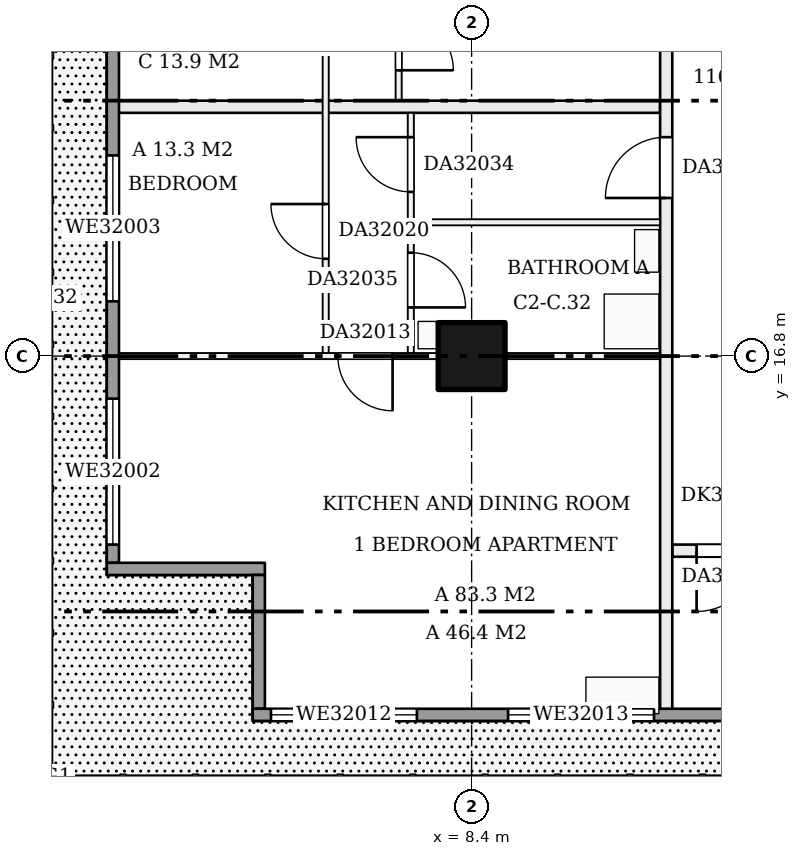
"""IFC4 building model, lengths in metres.
Left out: names, types, materials, properties, quantities, classifications, styles, units other than length and angle.
Written with IfcOpenShell. Run it as: python <this file> out.ifc"""

import sys

from ifc_helpers import new_model, si_unit, direction, frame, frame_2d, origin, origin_2d, place, context, subcontext, project, spatial, rectangle, extrude, element, fill, save


model = new_model("IFC4")
c1 = context("Model", 3, precision=1e-05, world=origin(), true_north=direction((0.0, 1.0)))
c2 = subcontext(c1, "Body", "Model", "MODEL_VIEW")
j1 = project(units=[si_unit("LENGTHUNIT", "METRE"), si_unit("PLANEANGLEUNIT", "RADIAN")], contexts=[c1])
p1 = place(None, origin())
s1 = spatial("IfcSite", under=j1, at=p1, CompositionType="ELEMENT")
p2 = place(p1, origin())
s2 = spatial("IfcBuilding", under=s1, at=p2, CompositionType="ELEMENT")
p3 = place(p2, frame((0.0, 0.0, 126.7)))
s3 = spatial("IfcBuildingStorey", under=s2, at=p3, CompositionType="ELEMENT", Elevation=126.7)
p4 = place(p3, frame((8.4, 16.8, 0.0), z_axis=(0.0, 0.0, 1.0), x_axis=(1.0, 0.0, 0.0)))
e1 = element("IfcColumn", 1, at=p4, inside=s3, PredefinedType="COLUMN", context=c2, shape_type="SweptSolid", body=[
    extrude(rectangle(XDim=1.1, YDim=1.1, at=origin_2d()), origin(), (0.0, 0.0, 1.0), 3.22),
])
p5 = place(p3, frame((11.7, 13.6, 0.0), z_axis=(0.0, 0.0, 1.0), x_axis=(1.0, 0.0, 0.0)))
e2 = element("IfcWall", 2, at=p5, inside=s3, PredefinedType="PARTITIONING", context=c2, shape_type="SweptSolid", body=[
    extrude(rectangle(XDim=1.8, YDim=0.2, at=frame_2d((0.9, 0.0))), origin(), (0.0, 0.0, 1.0), 3.22),
])
p6 = place(p5, frame((0.4, 0.0, 0.0)))
e3 = element("IfcOpeningElement", 3, at=p6, cuts=e2, PredefinedType="OPENING", context=c2, shape_type="SweptSolid", body=[
    extrude(rectangle(XDim=1.0, YDim=2.1, at=frame_2d((0.5, 1.05))), frame((0.0, 0.11, 0.0), z_axis=(0.0, -1.0, 0.0), x_axis=(1.0, 0.0, 0.0)), (0.0, 0.0, 1.0), 0.22),
])
p7 = place(p3, frame((2.5, 16.8, 0.0), z_axis=(0.0, 0.0, 1.0), x_axis=(1.0, 0.0, 0.0)))
e4 = element("IfcWall", 4, at=p7, inside=s3, PredefinedType="PARTITIONING", context=c2, shape_type="SweptSolid", body=[
    extrude(rectangle(XDim=9.0, YDim=0.1, at=frame_2d((4.5, 0.0))), origin(), (0.0, 0.0, 1.0), 3.22),
])
p8 = place(p7, frame((3.7, 0.0, 0.0)))
e5 = element("IfcOpeningElement", 5, at=p8, cuts=e4, PredefinedType="OPENING", context=c2, shape_type="SweptSolid", body=[
    extrude(rectangle(XDim=0.9, YDim=2.1, at=frame_2d((0.45, 1.05))), frame((0.0, 0.06, 0.0), z_axis=(0.0, -1.0, 0.0), x_axis=(1.0, 0.0, 0.0)), (0.0, 0.0, 1.0), 0.12),
])
p9 = place(p3, frame((7.45, 19.0, 0.0), z_axis=(0.0, 0.0, 1.0), x_axis=(1.0, 0.0, 0.0)))
e6 = element("IfcWall", 6, at=p9, inside=s3, PredefinedType="PARTITIONING", context=c2, shape_type="SweptSolid", body=[
    extrude(rectangle(XDim=4.05, YDim=0.1, at=frame_2d((2.025, 0.0))), origin(), (0.0, 0.0, 1.0), 3.22),
])
p10 = place(p3, frame((2.5, 20.9, 0.0), z_axis=(0.0, 0.0, 1.0), x_axis=(1.0, 0.0, 0.0)))
e7 = element("IfcWall", 7, at=p10, inside=s3, PredefinedType="PARTITIONING", context=c2, shape_type="SweptSolid", body=[
    extrude(rectangle(XDim=9.0, YDim=0.2, at=frame_2d((4.5, 0.0))), origin(), (0.0, 0.0, 1.0), 3.22),
])
p11 = place(p3, frame((6.0, 16.85, 0.0), z_axis=(0.0, 0.0, 1.0), x_axis=(0.0, 1.0, 0.0)))
e8 = element("IfcWall", 8, at=p11, inside=s3, PredefinedType="PARTITIONING", context=c2, shape_type="SweptSolid", body=[
    extrude(rectangle(XDim=25.05, YDim=0.1, at=frame_2d((12.525, 0.0))), origin(), (0.0, 0.0, 1.0), 3.22),
])
p12 = place(p11, frame((1.55, 0.0, 0.0)))
e9 = element("IfcOpeningElement", 9, at=p12, cuts=e8, PredefinedType="OPENING", context=c2, shape_type="SweptSolid", body=[
    extrude(rectangle(XDim=0.9, YDim=2.1, at=frame_2d((0.45, 1.05))), frame((0.0, 0.06, 0.0), z_axis=(0.0, -1.0, 0.0), x_axis=(1.0, 0.0, 0.0)), (0.0, 0.0, 1.0), 0.12),
])
p13 = place(p11, frame((5.75, 0.0, 0.0)))
e10 = element("IfcOpeningElement", 10, at=p13, cuts=e8, PredefinedType="OPENING", context=c2, shape_type="SweptSolid", body=[
    extrude(rectangle(XDim=0.9, YDim=2.1, at=frame_2d((0.45, 1.05))), frame((0.0, 0.06, 0.0), z_axis=(0.0, -1.0, 0.0), x_axis=(1.0, 0.0, 0.0)), (0.0, 0.0, 1.0), 0.12),
])
p14 = place(p11, frame((14.15, 0.0, 0.0)))
e11 = element("IfcOpeningElement", 11, at=p14, cuts=e8, PredefinedType="OPENING", context=c2, shape_type="SweptSolid", body=[
    extrude(rectangle(XDim=0.9, YDim=2.1, at=frame_2d((0.45, 1.05))), frame((0.0, 0.06, 0.0), z_axis=(0.0, -1.0, 0.0), x_axis=(1.0, 0.0, 0.0)), (0.0, 0.0, 1.0), 0.12),
])
p15 = place(p11, frame((22.55, 0.0, 0.0)))
e12 = element("IfcOpeningElement", 12, at=p15, cuts=e8, PredefinedType="OPENING", context=c2, shape_type="SweptSolid", body=[
    extrude(rectangle(XDim=0.9, YDim=2.1, at=frame_2d((0.45, 1.05))), frame((0.0, 0.06, 0.0), z_axis=(0.0, -1.0, 0.0), x_axis=(1.0, 0.0, 0.0)), (0.0, 0.0, 1.0), 0.12),
])
p16 = place(p3, frame((7.2, 21.0, 0.0), z_axis=(0.0, 0.0, 1.0), x_axis=(0.0, 1.0, 0.0)))
e13 = element("IfcWall", 13, at=p16, inside=s3, PredefinedType="PARTITIONING", context=c2, shape_type="SweptSolid", body=[
    extrude(rectangle(XDim=20.9, YDim=0.1, at=frame_2d((10.45, 0.0))), origin(), (0.0, 0.0, 1.0), 3.22),
])
p17 = place(p16, frame((2.837, 0.0, 0.0)))
e14 = element("IfcOpeningElement", 14, at=p17, cuts=e13, PredefinedType="OPENING", context=c2, shape_type="SweptSolid", body=[
    extrude(rectangle(XDim=0.9, YDim=2.1, at=frame_2d((0.45, 1.05))), frame((0.0, 0.06, 0.0), z_axis=(0.0, -1.0, 0.0), x_axis=(1.0, 0.0, 0.0)), (0.0, 0.0, 1.0), 0.12),
])
p18 = place(p16, frame((0.5, 0.0, 0.0)))
e15 = element("IfcOpeningElement", 15, at=p18, cuts=e13, PredefinedType="OPENING", context=c2, shape_type="SweptSolid", body=[
    extrude(rectangle(XDim=0.9, YDim=2.1, at=frame_2d((0.45, 1.05))), frame((0.0, 0.06, 0.0), z_axis=(0.0, -1.0, 0.0), x_axis=(1.0, 0.0, 0.0)), (0.0, 0.0, 1.0), 0.12),
])
p19 = place(p16, frame((5.175, 0.0, 0.0)))
e16 = element("IfcOpeningElement", 16, at=p19, cuts=e13, PredefinedType="OPENING", context=c2, shape_type="SweptSolid", body=[
    extrude(rectangle(XDim=0.9, YDim=2.1, at=frame_2d((0.45, 1.05))), frame((0.0, 0.06, 0.0), z_axis=(0.0, -1.0, 0.0), x_axis=(1.0, 0.0, 0.0)), (0.0, 0.0, 1.0), 0.12),
])
p20 = place(p16, frame((7.613, 0.0, 0.0)))
e17 = element("IfcOpeningElement", 17, at=p20, cuts=e13, PredefinedType="OPENING", context=c2, shape_type="SweptSolid", body=[
    extrude(rectangle(XDim=0.9, YDim=2.1, at=frame_2d((0.45, 1.05))), frame((0.0, 0.06, 0.0), z_axis=(0.0, -1.0, 0.0), x_axis=(1.0, 0.0, 0.0)), (0.0, 0.0, 1.0), 0.12),
])
p21 = place(p16, frame((10.35, 0.0, 0.0)))
e18 = element("IfcOpeningElement", 18, at=p21, cuts=e13, PredefinedType="OPENING", context=c2, shape_type="SweptSolid", body=[
    extrude(rectangle(XDim=0.9, YDim=2.1, at=frame_2d((0.45, 1.05))), frame((0.0, 0.06, 0.0), z_axis=(0.0, -1.0, 0.0), x_axis=(1.0, 0.0, 0.0)), (0.0, 0.0, 1.0), 0.12),
])
p22 = place(p16, frame((13.088, 0.0, 0.0)))
e19 = element("IfcOpeningElement", 19, at=p22, cuts=e13, PredefinedType="OPENING", context=c2, shape_type="SweptSolid", body=[
    extrude(rectangle(XDim=0.9, YDim=2.1, at=frame_2d((0.45, 1.05))), frame((0.0, 0.06, 0.0), z_axis=(0.0, -1.0, 0.0), x_axis=(1.0, 0.0, 0.0)), (0.0, 0.0, 1.0), 0.12),
])
p23 = place(p16, frame((16.125, 0.0, 0.0)))
e20 = element("IfcOpeningElement", 20, at=p23, cuts=e13, PredefinedType="OPENING", context=c2, shape_type="SweptSolid", body=[
    extrude(rectangle(XDim=0.9, YDim=2.1, at=frame_2d((0.45, 1.05))), frame((0.0, 0.06, 0.0), z_axis=(0.0, -1.0, 0.0), x_axis=(1.0, 0.0, 0.0)), (0.0, 0.0, 1.0), 0.12),
])
p24 = place(p16, frame((19.163, 0.0, 0.0)))
e21 = element("IfcOpeningElement", 21, at=p24, cuts=e13, PredefinedType="OPENING", context=c2, shape_type="SweptSolid", body=[
    extrude(rectangle(XDim=0.9, YDim=2.1, at=frame_2d((0.45, 1.05))), frame((0.0, 0.06, 0.0), z_axis=(0.0, -1.0, 0.0), x_axis=(1.0, 0.0, 0.0)), (0.0, 0.0, 1.0), 0.12),
])
p25 = place(p3, frame((7.4, 16.85, 0.0), z_axis=(0.0, 0.0, 1.0), x_axis=(0.0, 1.0, 0.0)))
e22 = element("IfcWall", 22, at=p25, inside=s3, PredefinedType="PARTITIONING", context=c2, shape_type="SweptSolid", body=[
    extrude(rectangle(XDim=3.95, YDim=0.1, at=frame_2d((1.975, 0.0))), origin(), (0.0, 0.0, 1.0), 3.22),
])
p26 = place(p25, frame((2.65, 0.0, 0.0)))
e23 = element("IfcOpeningElement", 23, at=p26, cuts=e22, PredefinedType="OPENING", context=c2, shape_type="SweptSolid", body=[
    extrude(rectangle(XDim=0.9, YDim=2.1, at=frame_2d((0.45, 1.05))), frame((0.0, 0.06, 0.0), z_axis=(0.0, -1.0, 0.0), x_axis=(1.0, 0.0, 0.0)), (0.0, 0.0, 1.0), 0.12),
])
p27 = place(p25, frame((0.75, 0.0, 0.0)))
e24 = element("IfcOpeningElement", 24, at=p27, cuts=e22, PredefinedType="OPENING", context=c2, shape_type="SweptSolid", body=[
    extrude(rectangle(XDim=0.9, YDim=2.1, at=frame_2d((0.45, 1.05))), frame((0.0, 0.06, 0.0), z_axis=(0.0, -1.0, 0.0), x_axis=(1.0, 0.0, 0.0)), (0.0, 0.0, 1.0), 0.12),
])
p28 = place(p3, frame((11.6, 10.9, 0.0), z_axis=(0.0, 0.0, 1.0), x_axis=(0.0, 1.0, 0.0)))
e25 = element("IfcWall", 25, at=p28, inside=s3, PredefinedType="PARTITIONING", context=c2, shape_type="SweptSolid", body=[
    extrude(rectangle(XDim=31.1, YDim=0.2, at=frame_2d((15.55, 0.0))), origin(), (0.0, 0.0, 1.0), 3.22),
])
p29 = place(p28, frame((8.5, 0.0, 0.0)))
e26 = element("IfcOpeningElement", 26, at=p29, cuts=e25, PredefinedType="OPENING", context=c2, shape_type="SweptSolid", body=[
    extrude(rectangle(XDim=1.0, YDim=2.1, at=frame_2d((0.5, 1.05))), frame((0.0, 0.11, 0.0), z_axis=(0.0, -1.0, 0.0), x_axis=(1.0, 0.0, 0.0)), (0.0, 0.0, 1.0), 0.22),
])
p30 = place(p28, frame((12.937, 0.0, 0.0)))
e27 = element("IfcOpeningElement", 27, at=p30, cuts=e25, PredefinedType="OPENING", context=c2, shape_type="SweptSolid", body=[
    extrude(rectangle(XDim=1.0, YDim=2.1, at=frame_2d((0.5, 1.05))), frame((0.0, 0.11, 0.0), z_axis=(0.0, -1.0, 0.0), x_axis=(1.0, 0.0, 0.0)), (0.0, 0.0, 1.0), 0.22),
])
p31 = place(p3, frame((2.5, 53.8, 0.0), z_axis=(0.0, 0.0, 1.0), x_axis=(0.0, -1.0, 0.0)))
e28 = element("IfcWall", 28, at=p31, inside=s3, PredefinedType="SOLIDWALL", context=c2, shape_type="SweptSolid", body=[
    extrude(rectangle(XDim=40.4, YDim=0.2, at=frame_2d((20.2, 0.0))), origin(), (0.0, 0.0, 1.0), 3.22),
])
p32 = place(p31, frame((37.7, 0.0, 0.9)))
e29 = element("IfcOpeningElement", 29, at=p32, cuts=e28, PredefinedType="OPENING", context=c2, shape_type="SweptSolid", body=[
    extrude(rectangle(XDim=2.4, YDim=1.5, at=frame_2d((1.2, 0.75))), frame((0.0, 0.11, 0.0), z_axis=(0.0, -1.0, 0.0), x_axis=(1.0, 0.0, 0.0)), (0.0, 0.0, 1.0), 0.22),
])
p33 = place(p31, frame((33.7, 0.0, 0.9)))
e30 = element("IfcOpeningElement", 30, at=p33, cuts=e28, PredefinedType="OPENING", context=c2, shape_type="SweptSolid", body=[
    extrude(rectangle(XDim=2.4, YDim=1.5, at=frame_2d((1.2, 0.75))), frame((0.0, 0.11, 0.0), z_axis=(0.0, -1.0, 0.0), x_axis=(1.0, 0.0, 0.0)), (0.0, 0.0, 1.0), 0.22),
])
p34 = place(p31, frame((29.5, 0.0, 0.9)))
e31 = element("IfcOpeningElement", 31, at=p34, cuts=e28, PredefinedType="OPENING", context=c2, shape_type="SweptSolid", body=[
    extrude(rectangle(XDim=2.4, YDim=1.5, at=frame_2d((1.2, 0.75))), frame((0.0, 0.11, 0.0), z_axis=(0.0, -1.0, 0.0), x_axis=(1.0, 0.0, 0.0)), (0.0, 0.0, 1.0), 0.22),
])
p35 = place(p31, frame((25.3, 0.0, 0.0)))
e32 = element("IfcOpeningElement", 32, at=p35, cuts=e28, PredefinedType="OPENING", context=c2, shape_type="SweptSolid", body=[
    extrude(rectangle(XDim=2.4, YDim=2.2, at=frame_2d((1.2, 1.1))), frame((0.0, 0.11, 0.0), z_axis=(0.0, -1.0, 0.0), x_axis=(1.0, 0.0, 0.0)), (0.0, 0.0, 1.0), 0.22),
])
p36 = place(p31, frame((21.1, 0.0, 0.0)))
e33 = element("IfcOpeningElement", 33, at=p36, cuts=e28, PredefinedType="OPENING", context=c2, shape_type="SweptSolid", body=[
    extrude(rectangle(XDim=2.4, YDim=2.2, at=frame_2d((1.2, 1.1))), frame((0.0, 0.11, 0.0), z_axis=(0.0, -1.0, 0.0), x_axis=(1.0, 0.0, 0.0)), (0.0, 0.0, 1.0), 0.22),
])
p37 = place(p31, frame((16.9, 0.0, 0.0)))
e34 = element("IfcOpeningElement", 34, at=p37, cuts=e28, PredefinedType="OPENING", context=c2, shape_type="SweptSolid", body=[
    extrude(rectangle(XDim=2.4, YDim=2.2, at=frame_2d((1.2, 1.1))), frame((0.0, 0.11, 0.0), z_axis=(0.0, -1.0, 0.0), x_axis=(1.0, 0.0, 0.0)), (0.0, 0.0, 1.0), 0.22),
])
p38 = place(p31, frame((12.7, 0.0, 0.9)))
e35 = element("IfcOpeningElement", 35, at=p38, cuts=e28, PredefinedType="OPENING", context=c2, shape_type="SweptSolid", body=[
    extrude(rectangle(XDim=2.4, YDim=1.5, at=frame_2d((1.2, 0.75))), frame((0.0, 0.11, 0.0), z_axis=(0.0, -1.0, 0.0), x_axis=(1.0, 0.0, 0.0)), (0.0, 0.0, 1.0), 0.22),
])
p39 = place(p31, frame((8.5, 0.0, 0.9)))
e36 = element("IfcOpeningElement", 36, at=p39, cuts=e28, PredefinedType="OPENING", context=c2, shape_type="SweptSolid", body=[
    extrude(rectangle(XDim=2.4, YDim=1.5, at=frame_2d((1.2, 0.75))), frame((0.0, 0.11, 0.0), z_axis=(0.0, -1.0, 0.0), x_axis=(1.0, 0.0, 0.0)), (0.0, 0.0, 1.0), 0.22),
])
p40 = place(p31, frame((4.3, 0.0, 0.9)))
e37 = element("IfcOpeningElement", 37, at=p40, cuts=e28, PredefinedType="OPENING", context=c2, shape_type="SweptSolid", body=[
    extrude(rectangle(XDim=2.4, YDim=1.5, at=frame_2d((1.2, 0.75))), frame((0.0, 0.11, 0.0), z_axis=(0.0, -1.0, 0.0), x_axis=(1.0, 0.0, 0.0)), (0.0, 0.0, 1.0), 0.22),
])
p41 = place(p31, frame((0.3, 0.0, 0.0)))
e38 = element("IfcOpeningElement", 38, at=p41, cuts=e28, PredefinedType="OPENING", context=c2, shape_type="SweptSolid", body=[
    extrude(rectangle(XDim=2.4, YDim=2.2, at=frame_2d((1.2, 1.1))), frame((0.0, 0.11, 0.0), z_axis=(0.0, -1.0, 0.0), x_axis=(1.0, 0.0, 0.0)), (0.0, 0.0, 1.0), 0.22),
])
p42 = place(p3, frame((2.4, 13.3, 0.0), z_axis=(0.0, 0.0, 1.0), x_axis=(1.0, 0.0, 0.0)))
e39 = element("IfcWall", 39, at=p42, inside=s3, PredefinedType="SOLIDWALL", context=c2, shape_type="SweptSolid", body=[
    extrude(rectangle(XDim=2.6, YDim=0.2, at=frame_2d((1.3, 0.0))), origin(), (0.0, 0.0, 1.0), 3.22),
])
p43 = place(p3, frame((4.9, 13.2, 0.0), z_axis=(0.0, 0.0, 1.0), x_axis=(0.0, -1.0, 0.0)))
e40 = element("IfcWall", 40, at=p43, inside=s3, PredefinedType="SOLIDWALL", context=c2, shape_type="SweptSolid", body=[
    extrude(rectangle(XDim=2.2, YDim=0.2, at=frame_2d((1.1, 0.0))), origin(), (0.0, 0.0, 1.0), 3.22),
])
p44 = place(p3, frame((4.8, 10.9, 0.0), z_axis=(0.0, 0.0, 1.0), x_axis=(1.0, 0.0, 0.0)))
e41 = element("IfcWall", 41, at=p44, inside=s3, PredefinedType="SOLIDWALL", context=c2, shape_type="SweptSolid", body=[
    extrude(rectangle(XDim=37.2, YDim=0.2, at=frame_2d((18.6, 0.0))), origin(), (0.0, 0.0, 1.0), 3.22),
])
p45 = place(p44, frame((0.3, 0.0, 0.9)))
e42 = element("IfcOpeningElement", 42, at=p45, cuts=e41, PredefinedType="OPENING", context=c2, shape_type="SweptSolid", body=[
    extrude(rectangle(XDim=2.4, YDim=1.5, at=frame_2d((1.2, 0.75))), frame((0.0, 0.11, 0.0), z_axis=(0.0, -1.0, 0.0), x_axis=(1.0, 0.0, 0.0)), (0.0, 0.0, 1.0), 0.22),
])
p46 = place(p44, frame((4.2, 0.0, 0.9)))
e43 = element("IfcOpeningElement", 43, at=p46, cuts=e41, PredefinedType="OPENING", context=c2, shape_type="SweptSolid", body=[
    extrude(rectangle(XDim=2.4, YDim=1.5, at=frame_2d((1.2, 0.75))), frame((0.0, 0.11, 0.0), z_axis=(0.0, -1.0, 0.0), x_axis=(1.0, 0.0, 0.0)), (0.0, 0.0, 1.0), 0.22),
])
p47 = place(p44, frame((12.9, 0.0, 0.9)))
e44 = element("IfcOpeningElement", 44, at=p47, cuts=e41, PredefinedType="OPENING", context=c2, shape_type="SweptSolid", body=[
    extrude(rectangle(XDim=2.4, YDim=1.5, at=frame_2d((1.2, 0.75))), frame((0.0, 0.11, 0.0), z_axis=(0.0, -1.0, 0.0), x_axis=(1.0, 0.0, 0.0)), (0.0, 0.0, 1.0), 0.22),
])
p48 = place(p44, frame((17.1, 0.0, 0.0)))
e45 = element("IfcOpeningElement", 45, at=p48, cuts=e41, PredefinedType="OPENING", context=c2, shape_type="SweptSolid", body=[
    extrude(rectangle(XDim=2.4, YDim=2.2, at=frame_2d((1.2, 1.1))), frame((0.0, 0.11, 0.0), z_axis=(0.0, -1.0, 0.0), x_axis=(1.0, 0.0, 0.0)), (0.0, 0.0, 1.0), 0.22),
])
p49 = place(p44, frame((21.3, 0.0, 0.0)))
e46 = element("IfcOpeningElement", 46, at=p49, cuts=e41, PredefinedType="OPENING", context=c2, shape_type="SweptSolid", body=[
    extrude(rectangle(XDim=2.4, YDim=2.2, at=frame_2d((1.2, 1.1))), frame((0.0, 0.11, 0.0), z_axis=(0.0, -1.0, 0.0), x_axis=(1.0, 0.0, 0.0)), (0.0, 0.0, 1.0), 0.22),
])
p50 = place(p44, frame((25.5, 0.0, 0.0)))
e47 = element("IfcOpeningElement", 47, at=p50, cuts=e41, PredefinedType="OPENING", context=c2, shape_type="SweptSolid", body=[
    extrude(rectangle(XDim=2.4, YDim=2.2, at=frame_2d((1.2, 1.1))), frame((0.0, 0.11, 0.0), z_axis=(0.0, -1.0, 0.0), x_axis=(1.0, 0.0, 0.0)), (0.0, 0.0, 1.0), 0.22),
])
p51 = place(p44, frame((29.7, 0.0, 0.0)))
e48 = element("IfcOpeningElement", 48, at=p51, cuts=e41, PredefinedType="OPENING", context=c2, shape_type="SweptSolid", body=[
    extrude(rectangle(XDim=2.4, YDim=2.2, at=frame_2d((1.2, 1.1))), frame((0.0, 0.11, 0.0), z_axis=(0.0, -1.0, 0.0), x_axis=(1.0, 0.0, 0.0)), (0.0, 0.0, 1.0), 0.22),
])
p52 = place(p44, frame((33.9, 0.0, 0.0)))
e49 = element("IfcOpeningElement", 49, at=p52, cuts=e41, PredefinedType="OPENING", context=c2, shape_type="SweptSolid", body=[
    extrude(rectangle(XDim=1.3, YDim=2.2, at=frame_2d((0.65, 1.1))), frame((0.0, 0.11, 0.0), z_axis=(0.0, -1.0, 0.0), x_axis=(1.0, 0.0, 0.0)), (0.0, 0.0, 1.0), 0.22),
])
p53 = place(p6, frame((1.0, 0.0, 0.0), z_axis=(0.0, 0.0, 1.0), x_axis=(-1.0, 0.0, 0.0)))
e50 = element("IfcDoor", 50, at=p53, inside=s3, OperationType="SINGLE_SWING_RIGHT", PredefinedType="DOOR", context=c2, shape_type="SweptSolid", body=[
    extrude(rectangle(XDim=1.0, YDim=2.1, at=frame_2d((0.5, 1.05))), frame((0.0, 0.025, 0.0), z_axis=(0.0, -1.0, 0.0), x_axis=(1.0, 0.0, 0.0)), (0.0, 0.0, 1.0), 0.05),
])
fill(e3, e50)
p54 = place(p8, frame((0.9, 0.0, 0.0), z_axis=(0.0, 0.0, 1.0), x_axis=(-1.0, 0.0, 0.0)))
e51 = element("IfcDoor", 51, at=p54, inside=s3, OperationType="SINGLE_SWING_LEFT", PredefinedType="DOOR", context=c2, shape_type="SweptSolid", body=[
    extrude(rectangle(XDim=0.9, YDim=2.1, at=frame_2d((0.45, 1.05))), frame((0.0, 0.025, 0.0), z_axis=(0.0, -1.0, 0.0), x_axis=(1.0, 0.0, 0.0)), (0.0, 0.0, 1.0), 0.05),
])
fill(e5, e51)
p55 = place(p12, origin())
e52 = element("IfcDoor", 52, at=p55, inside=s3, OperationType="SINGLE_SWING_RIGHT", PredefinedType="DOOR", context=c2, shape_type="SweptSolid", body=[
    extrude(rectangle(XDim=0.9, YDim=2.1, at=frame_2d((0.45, 1.05))), frame((0.0, 0.025, 0.0), z_axis=(0.0, -1.0, 0.0), x_axis=(1.0, 0.0, 0.0)), (0.0, 0.0, 1.0), 0.05),
])
fill(e9, e52)
p56 = place(p18, frame((0.9, 0.0, 0.0), z_axis=(0.0, 0.0, 1.0), x_axis=(-1.0, 0.0, 0.0)))
e53 = element("IfcDoor", 53, at=p56, inside=s3, OperationType="SINGLE_SWING_RIGHT", PredefinedType="DOOR", context=c2, shape_type="SweptSolid", body=[
    extrude(rectangle(XDim=0.9, YDim=2.1, at=frame_2d((0.45, 1.05))), frame((0.0, 0.025, 0.0), z_axis=(0.0, -1.0, 0.0), x_axis=(1.0, 0.0, 0.0)), (0.0, 0.0, 1.0), 0.05),
])
fill(e15, e53)
p57 = place(p26, origin())
e54 = element("IfcDoor", 54, at=p57, inside=s3, OperationType="SINGLE_SWING_RIGHT", PredefinedType="DOOR", context=c2, shape_type="SweptSolid", body=[
    extrude(rectangle(XDim=0.9, YDim=2.1, at=frame_2d((0.45, 1.05))), frame((0.0, 0.025, 0.0), z_axis=(0.0, -1.0, 0.0), x_axis=(1.0, 0.0, 0.0)), (0.0, 0.0, 1.0), 0.05),
])
fill(e23, e54)
p58 = place(p27, frame((0.9, 0.0, 0.0), z_axis=(0.0, 0.0, 1.0), x_axis=(-1.0, 0.0, 0.0)))
e55 = element("IfcDoor", 55, at=p58, inside=s3, OperationType="SINGLE_SWING_RIGHT", PredefinedType="DOOR", context=c2, shape_type="SweptSolid", body=[
    extrude(rectangle(XDim=0.9, YDim=2.1, at=frame_2d((0.45, 1.05))), frame((0.0, 0.025, 0.0), z_axis=(0.0, -1.0, 0.0), x_axis=(1.0, 0.0, 0.0)), (0.0, 0.0, 1.0), 0.05),
])
fill(e24, e55)
p59 = place(p29, origin())
e56 = element("IfcDoor", 56, at=p59, inside=s3, OperationType="SINGLE_SWING_LEFT", PredefinedType="DOOR", context=c2, shape_type="SweptSolid", body=[
    extrude(rectangle(XDim=1.0, YDim=2.1, at=frame_2d((0.5, 1.05))), frame((0.0, 0.025, 0.0), z_axis=(0.0, -1.0, 0.0), x_axis=(1.0, 0.0, 0.0)), (0.0, 0.0, 1.0), 0.05),
])
fill(e26, e56)
p60 = place(p32, origin())
e57 = element("IfcWindow", 57, at=p60, inside=s3, PartitioningType="SINGLE_PANEL", PredefinedType="WINDOW", context=c2, shape_type="SweptSolid", body=[
    extrude(rectangle(XDim=2.4, YDim=1.5, at=frame_2d((1.2, 0.75))), frame((0.0, 0.03, 0.0), z_axis=(0.0, -1.0, 0.0), x_axis=(1.0, 0.0, 0.0)), (0.0, 0.0, 1.0), 0.06),
])
fill(e29, e57)
p61 = place(p33, origin())
e58 = element("IfcWindow", 58, at=p61, inside=s3, PartitioningType="SINGLE_PANEL", PredefinedType="WINDOW", context=c2, shape_type="SweptSolid", body=[
    extrude(rectangle(XDim=2.4, YDim=1.5, at=frame_2d((1.2, 0.75))), frame((0.0, 0.03, 0.0), z_axis=(0.0, -1.0, 0.0), x_axis=(1.0, 0.0, 0.0)), (0.0, 0.0, 1.0), 0.06),
])
fill(e30, e58)
p62 = place(p45, origin())
e59 = element("IfcWindow", 59, at=p62, inside=s3, PartitioningType="SINGLE_PANEL", PredefinedType="WINDOW", context=c2, shape_type="SweptSolid", body=[
    extrude(rectangle(XDim=2.4, YDim=1.5, at=frame_2d((1.2, 0.75))), frame((0.0, 0.03, 0.0), z_axis=(0.0, -1.0, 0.0), x_axis=(1.0, 0.0, 0.0)), (0.0, 0.0, 1.0), 0.06),
])
fill(e42, e59)
p63 = place(p46, origin())
e60 = element("IfcWindow", 60, at=p63, inside=s3, PartitioningType="SINGLE_PANEL", PredefinedType="WINDOW", context=c2, shape_type="SweptSolid", body=[
    extrude(rectangle(XDim=2.4, YDim=1.5, at=frame_2d((1.2, 0.75))), frame((0.0, 0.03, 0.0), z_axis=(0.0, -1.0, 0.0), x_axis=(1.0, 0.0, 0.0)), (0.0, 0.0, 1.0), 0.06),
])
fill(e43, e60)
save(model, sys.argv[1])
